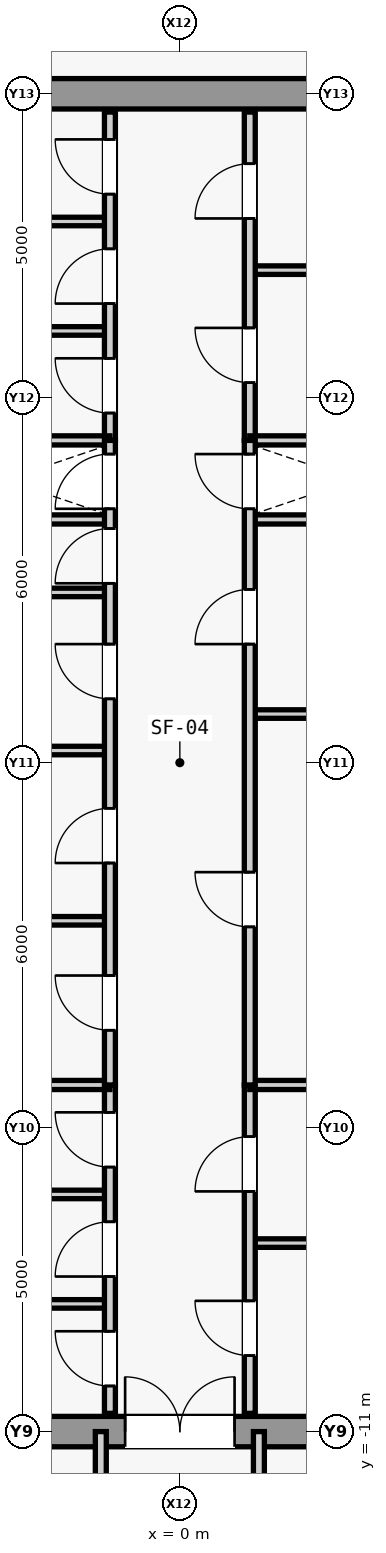
"""IFC4 building model, lengths in metres.
Left out: names, types, materials, properties, quantities, classifications, styles, units other than length and angle.
Written with IfcOpenShell. Run it as: python <this file> out.ifc"""

import sys

from ifc_helpers import new_model, si_unit, direction, frame, frame_2d, origin, place, context, subcontext, project, spatial, rectangle, extrude, source, transform, mapped, element, fill, save


model = new_model("IFC4")
c1 = context("Model", 3, precision=1e-05, world=origin(), true_north=direction((0.0, 1.0)))
c2 = subcontext(c1, "Body", "Model", "MODEL_VIEW")
j1 = project(units=[si_unit("LENGTHUNIT", "METRE"), si_unit("PLANEANGLEUNIT", "RADIAN")], contexts=[c1])
p1 = place(None, origin())
s1 = spatial("IfcSite", under=j1, at=p1, CompositionType="ELEMENT")
p2 = place(p1, origin())
s2 = spatial("IfcBuilding", under=s1, at=p2, CompositionType="ELEMENT")
p3 = place(p2, frame((0.0, 0.0, 277.5)))
s3 = spatial("IfcBuildingStorey", under=s2, at=p3, CompositionType="ELEMENT", Elevation=277.5)
m1 = source(origin(), c2, "Body", "SweptSolid", [
    extrude(rectangle(XDim=9.2, YDim=0.5, at=frame_2d((4.6, 0.0))), origin(), (0.0, 0.0, 1.0), 3.78),
])
p4 = place(p3, frame((-4.6, -11.0, 0.0), z_axis=(0.0, 0.0, 1.0), x_axis=(1.0, 0.0, 0.0)))
e1 = element("IfcWall", 1, at=p4, inside=s3, PredefinedType="SHEAR", context=c2, shape_type="MappedRepresentation", body=[
    mapped(m1, transform((0.0, 0.0, 0.0), scale=1.0)),
])
m2 = source(origin(), c2, "Body", "SweptSolid", [
    extrude(rectangle(XDim=1.8, YDim=2.25, at=frame_2d((0.9, 1.125))), frame((0.0, 0.26, 0.0), z_axis=(0.0, -1.0, 0.0), x_axis=(1.0, 0.0, 0.0)), (0.0, 0.0, 1.0), 0.52),
])
p5 = place(p4, frame((3.7, 0.0, 0.0)))
e2 = element("IfcOpeningElement", 2, at=p5, cuts=e1, PredefinedType="OPENING", context=c2, shape_type="MappedRepresentation", body=[
    mapped(m2, transform((0.0, 0.0, 0.0), scale=1.0)),
])
p6 = place(p3, frame((-4.6, 11.0, 0.0), z_axis=(0.0, 0.0, 1.0), x_axis=(1.0, 0.0, 0.0)))
e3 = element("IfcWall", 3, at=p6, inside=s3, PredefinedType="SHEAR", context=c2, shape_type="MappedRepresentation", body=[
    mapped(m1, transform((0.0, 0.0, 0.0), scale=1.0)),
])
m3 = source(origin(), c2, "Body", "SweptSolid", [
    extrude(rectangle(XDim=3.45, YDim=0.15, at=frame_2d((1.725, 0.0))), origin(), (0.0, 0.0, 1.0), 3.78),
])
for number, where, z_axis, x_axis in (
    (4, (-4.6, 4.0, 0.0), (0.0, 0.0, 1.0), (1.0, 0.0, 0.0)),
    (5, (1.15, 4.0, 0.0), (0.0, 0.0, 1.0), (1.0, 0.0, 0.0)),
):
    element("IfcWall", number, at=place(p3, frame(where, z_axis=z_axis, x_axis=x_axis)), inside=s3, PredefinedType="PARTITIONING", context=c2, shape_type="MappedRepresentation", body=[
        mapped(m3, transform((0.0, 0.0, 0.0), scale=1.0)),
    ])
m4 = source(origin(), c2, "Body", "SweptSolid", [
    extrude(rectangle(XDim=3.45, YDim=0.14, at=frame_2d((1.725, 0.0))), origin(), (0.0, 0.0, 1.0), 3.78),
])
for number, where, z_axis, x_axis in (
    (6, (-4.6, -8.9, 0.0), (0.0, 0.0, 1.0), (1.0, 0.0, 0.0)),
    (7, (-4.6, -7.1, 0.0), (0.0, 0.0, 1.0), (1.0, 0.0, 0.0)),
):
    element("IfcWall", number, at=place(p3, frame(where, z_axis=z_axis, x_axis=x_axis)), inside=s3, PredefinedType="PARTITIONING", context=c2, shape_type="MappedRepresentation", body=[
        mapped(m4, transform((0.0, 0.0, 0.0), scale=1.0)),
    ])
m5 = source(origin(), c2, "Body", "SweptSolid", [
    extrude(rectangle(XDim=5.4, YDim=0.18, at=frame_2d((2.7, 0.0))), origin(), (0.0, 0.0, 1.0), 3.78),
])
p7 = place(p3, frame((-1.15, -10.7, 0.0), z_axis=(0.0, 0.0, 1.0), x_axis=(0.0, 1.0, 0.0)))
e8 = element("IfcWall", 8, at=p7, inside=s3, PredefinedType="PARTITIONING", context=c2, shape_type="MappedRepresentation", body=[
    mapped(m5, transform((0.0, 0.0, 0.0), scale=1.0)),
])
m6 = source(origin(), c2, "Body", "SweptSolid", [
    extrude(rectangle(XDim=0.9, YDim=2.15, at=frame_2d((0.45, 1.075))), frame((0.0, 0.1, 0.0), z_axis=(0.0, -1.0, 0.0), x_axis=(1.0, 0.0, 0.0)), (0.0, 0.0, 1.0), 0.2),
])
p8 = place(p7, frame((0.45, 0.0, 0.0)))
e9 = element("IfcOpeningElement", 9, at=p8, cuts=e8, PredefinedType="OPENING", context=c2, shape_type="MappedRepresentation", body=[
    mapped(m6, transform((0.0, 0.0, 0.0), scale=1.0)),
])
p9 = place(p7, frame((2.25, 0.0, 0.0)))
e10 = element("IfcOpeningElement", 10, at=p9, cuts=e8, PredefinedType="OPENING", context=c2, shape_type="MappedRepresentation", body=[
    mapped(m6, transform((0.0, 0.0, 0.0), scale=1.0)),
])
p10 = place(p7, frame((4.05, 0.0, 0.0)))
e11 = element("IfcOpeningElement", 11, at=p10, cuts=e8, PredefinedType="OPENING", context=c2, shape_type="MappedRepresentation", body=[
    mapped(m6, transform((0.0, 0.0, 0.0), scale=1.0)),
])
p11 = place(p3, frame((1.15, -7.9, 0.0), z_axis=(0.0, 0.0, 1.0), x_axis=(1.0, 0.0, 0.0)))
e12 = element("IfcWall", 12, at=p11, inside=s3, PredefinedType="PARTITIONING", context=c2, shape_type="MappedRepresentation", body=[
    mapped(m4, transform((0.0, 0.0, 0.0), scale=1.0)),
])
p12 = place(p3, frame((1.15, -10.7, 0.0), z_axis=(0.0, 0.0, 1.0), x_axis=(0.0, 1.0, 0.0)))
e13 = element("IfcWall", 13, at=p12, inside=s3, PredefinedType="PARTITIONING", context=c2, shape_type="MappedRepresentation", body=[
    mapped(m5, transform((0.0, 0.0, 0.0), scale=1.0)),
])
p13 = place(p12, frame((0.95, 0.0, 0.0)))
e14 = element("IfcOpeningElement", 14, at=p13, cuts=e13, PredefinedType="OPENING", context=c2, shape_type="MappedRepresentation", body=[
    mapped(m6, transform((0.0, 0.0, 0.0), scale=1.0)),
])
p14 = place(p12, frame((3.65, 0.0, 0.0)))
e15 = element("IfcOpeningElement", 15, at=p14, cuts=e13, PredefinedType="OPENING", context=c2, shape_type="MappedRepresentation", body=[
    mapped(m6, transform((0.0, 0.0, 0.0), scale=1.0)),
])
for number, where, z_axis, x_axis in (
    (16, (-4.6, -5.3, 0.0), (0.0, 0.0, 1.0), (1.0, 0.0, 0.0)),
    (17, (1.15, -5.3, 0.0), (0.0, 0.0, 1.0), (1.0, 0.0, 0.0)),
):
    element("IfcWall", number, at=place(p3, frame(where, z_axis=z_axis, x_axis=x_axis)), inside=s3, PredefinedType="PARTITIONING", context=c2, shape_type="MappedRepresentation", body=[
        mapped(m3, transform((0.0, 0.0, 0.0), scale=1.0)),
    ])
for number, where, z_axis, x_axis in (
    (18, (-4.6, 7.1, 0.0), (0.0, 0.0, 1.0), (1.0, 0.0, 0.0)),
    (19, (-4.6, 8.9, 0.0), (0.0, 0.0, 1.0), (1.0, 0.0, 0.0)),
):
    element("IfcWall", number, at=place(p3, frame(where, z_axis=z_axis, x_axis=x_axis)), inside=s3, PredefinedType="PARTITIONING", context=c2, shape_type="MappedRepresentation", body=[
        mapped(m4, transform((0.0, 0.0, 0.0), scale=1.0)),
    ])
p15 = place(p3, frame((-1.15, 5.3, 0.0), z_axis=(0.0, 0.0, 1.0), x_axis=(0.0, 1.0, 0.0)))
e20 = element("IfcWall", 20, at=p15, inside=s3, PredefinedType="PARTITIONING", context=c2, shape_type="MappedRepresentation", body=[
    mapped(m5, transform((0.0, 0.0, 0.0), scale=1.0)),
])
p16 = place(p15, frame((0.45, 0.0, 0.0)))
e21 = element("IfcOpeningElement", 21, at=p16, cuts=e20, PredefinedType="OPENING", context=c2, shape_type="MappedRepresentation", body=[
    mapped(m6, transform((0.0, 0.0, 0.0), scale=1.0)),
])
p17 = place(p15, frame((2.25, 0.0, 0.0)))
e22 = element("IfcOpeningElement", 22, at=p17, cuts=e20, PredefinedType="OPENING", context=c2, shape_type="MappedRepresentation", body=[
    mapped(m6, transform((0.0, 0.0, 0.0), scale=1.0)),
])
p18 = place(p15, frame((4.05, 0.0, 0.0)))
e23 = element("IfcOpeningElement", 23, at=p18, cuts=e20, PredefinedType="OPENING", context=c2, shape_type="MappedRepresentation", body=[
    mapped(m6, transform((0.0, 0.0, 0.0), scale=1.0)),
])
p19 = place(p3, frame((1.15, 8.1, 0.0), z_axis=(0.0, 0.0, 1.0), x_axis=(1.0, 0.0, 0.0)))
e24 = element("IfcWall", 24, at=p19, inside=s3, PredefinedType="PARTITIONING", context=c2, shape_type="MappedRepresentation", body=[
    mapped(m4, transform((0.0, 0.0, 0.0), scale=1.0)),
])
p20 = place(p3, frame((1.15, 5.3, 0.0), z_axis=(0.0, 0.0, 1.0), x_axis=(0.0, 1.0, 0.0)))
e25 = element("IfcWall", 25, at=p20, inside=s3, PredefinedType="PARTITIONING", context=c2, shape_type="MappedRepresentation", body=[
    mapped(m5, transform((0.0, 0.0, 0.0), scale=1.0)),
])
p21 = place(p20, frame((0.95, 0.0, 0.0)))
e26 = element("IfcOpeningElement", 26, at=p21, cuts=e25, PredefinedType="OPENING", context=c2, shape_type="MappedRepresentation", body=[
    mapped(m6, transform((0.0, 0.0, 0.0), scale=1.0)),
])
p22 = place(p20, frame((3.65, 0.0, 0.0)))
e27 = element("IfcOpeningElement", 27, at=p22, cuts=e25, PredefinedType="OPENING", context=c2, shape_type="MappedRepresentation", body=[
    mapped(m6, transform((0.0, 0.0, 0.0), scale=1.0)),
])
for number, where, z_axis, x_axis in (
    (28, (-4.6, 5.3, 0.0), (0.0, 0.0, 1.0), (1.0, 0.0, 0.0)),
    (29, (1.15, 5.3, 0.0), (0.0, 0.0, 1.0), (1.0, 0.0, 0.0)),
):
    element("IfcWall", number, at=place(p3, frame(where, z_axis=z_axis, x_axis=x_axis)), inside=s3, PredefinedType="PARTITIONING", context=c2, shape_type="MappedRepresentation", body=[
        mapped(m3, transform((0.0, 0.0, 0.0), scale=1.0)),
    ])
p23 = place(p3, frame((-4.6, -2.6, 0.0), z_axis=(0.0, 0.0, 1.0), x_axis=(1.0, 0.0, 0.0)))
e30 = element("IfcWall", 30, at=p23, inside=s3, PredefinedType="PARTITIONING", context=c2, shape_type="MappedRepresentation", body=[
    mapped(m4, transform((0.0, 0.0, 0.0), scale=1.0)),
])
m7 = source(origin(), c2, "Body", "SweptSolid", [
    extrude(rectangle(XDim=3.45, YDim=0.14, at=frame_2d((1.725, 0.0))), origin(), (0.0, 0.0, 1.0), 3.085),
])
p24 = place(p3, frame((-4.6, 0.2, 0.0), z_axis=(0.0, 0.0, 1.0), x_axis=(1.0, 0.0, 0.0)))
e31 = element("IfcWall", 31, at=p24, inside=s3, PredefinedType="PARTITIONING", context=c2, shape_type="MappedRepresentation", body=[
    mapped(m7, transform((0.0, 0.0, 0.0), scale=1.0)),
])
p25 = place(p3, frame((-4.6, 2.8, 0.0), z_axis=(0.0, 0.0, 1.0), x_axis=(1.0, 0.0, 0.0)))
e32 = element("IfcWall", 32, at=p25, inside=s3, PredefinedType="PARTITIONING", context=c2, shape_type="MappedRepresentation", body=[
    mapped(m4, transform((0.0, 0.0, 0.0), scale=1.0)),
])
m8 = source(origin(), c2, "Body", "SweptSolid", [
    extrude(rectangle(XDim=10.6, YDim=0.18, at=frame_2d((5.3, 0.0))), origin(), (0.0, 0.0, 1.0), 3.78),
])
p26 = place(p3, frame((-1.15, -5.3, 0.0), z_axis=(0.0, 0.0, 1.0), x_axis=(0.0, 1.0, 0.0)))
e33 = element("IfcWall", 33, at=p26, inside=s3, PredefinedType="PARTITIONING", context=c2, shape_type="MappedRepresentation", body=[
    mapped(m8, transform((0.0, 0.0, 0.0), scale=1.0)),
])
p27 = place(p26, frame((0.9, 0.0, 0.0)))
e34 = element("IfcOpeningElement", 34, at=p27, cuts=e33, PredefinedType="OPENING", context=c2, shape_type="MappedRepresentation", body=[
    mapped(m6, transform((0.0, 0.0, 0.0), scale=1.0)),
])
p28 = place(p26, frame((3.65, 0.0, 0.0)))
e35 = element("IfcOpeningElement", 35, at=p28, cuts=e33, PredefinedType="OPENING", context=c2, shape_type="MappedRepresentation", body=[
    mapped(m6, transform((0.0, 0.0, 0.0), scale=1.0)),
])
p29 = place(p26, frame((6.35, 0.0, 0.0)))
e36 = element("IfcOpeningElement", 36, at=p29, cuts=e33, PredefinedType="OPENING", context=c2, shape_type="MappedRepresentation", body=[
    mapped(m6, transform((0.0, 0.0, 0.0), scale=1.0)),
])
p30 = place(p26, frame((8.25, 0.0, 0.0)))
e37 = element("IfcOpeningElement", 37, at=p30, cuts=e33, PredefinedType="OPENING", context=c2, shape_type="MappedRepresentation", body=[
    mapped(m6, transform((0.0, 0.0, 0.0), scale=1.0)),
])
p31 = place(p26, frame((9.475, 0.0, 0.0)))
e38 = element("IfcOpeningElement", 38, at=p31, cuts=e33, PredefinedType="OPENING", context=c2, shape_type="MappedRepresentation", body=[
    mapped(m6, transform((0.0, 0.0, 0.0), scale=1.0)),
])
p32 = place(p3, frame((1.15, 0.8, 0.0), z_axis=(0.0, 0.0, 1.0), x_axis=(1.0, 0.0, 0.0)))
e39 = element("IfcWall", 39, at=p32, inside=s3, PredefinedType="PARTITIONING", context=c2, shape_type="MappedRepresentation", body=[
    mapped(m4, transform((0.0, 0.0, 0.0), scale=1.0)),
])
p33 = place(p3, frame((1.15, -5.3, 0.0), z_axis=(0.0, 0.0, 1.0), x_axis=(0.0, 1.0, 0.0)))
e40 = element("IfcWall", 40, at=p33, inside=s3, PredefinedType="PARTITIONING", context=c2, shape_type="MappedRepresentation", body=[
    mapped(m8, transform((0.0, 0.0, 0.0), scale=1.0)),
])
p34 = place(p33, frame((2.6, 0.0, 0.0)))
e41 = element("IfcOpeningElement", 41, at=p34, cuts=e40, PredefinedType="OPENING", context=c2, shape_type="MappedRepresentation", body=[
    mapped(m6, transform((0.0, 0.0, 0.0), scale=1.0)),
])
p35 = place(p33, frame((7.25, 0.0, 0.0)))
e42 = element("IfcOpeningElement", 42, at=p35, cuts=e40, PredefinedType="OPENING", context=c2, shape_type="MappedRepresentation", body=[
    mapped(m6, transform((0.0, 0.0, 0.0), scale=1.0)),
])
p36 = place(p33, frame((9.475, 0.0, 0.0)))
e43 = element("IfcOpeningElement", 43, at=p36, cuts=e40, PredefinedType="OPENING", context=c2, shape_type="MappedRepresentation", body=[
    mapped(m6, transform((0.0, 0.0, 0.0), scale=1.0)),
])
m9 = source(origin(), c2, "Body", "SweptSolid", [
    extrude(rectangle(XDim=6.0, YDim=0.18, at=frame_2d((3.0, 0.0))), origin(), (0.0, 0.0, 1.0), 3.78),
])
for number, where, z_axis, x_axis in (
    (44, (-1.3, -17.0, 0.0), (0.0, 0.0, 1.0), (0.0, 1.0, 0.0)),
    (45, (1.3, -17.0, 0.0), (0.0, 0.0, 1.0), (0.0, 1.0, 0.0)),
):
    element("IfcWall", number, at=place(p3, frame(where, z_axis=z_axis, x_axis=x_axis)), inside=s3, PredefinedType="PARTITIONING", context=c2, shape_type="MappedRepresentation", body=[
        mapped(m9, transform((0.0, 0.0, 0.0), scale=1.0)),
    ])
m10 = source(origin(), c2, "Body", "SweptSolid", [
    extrude(rectangle(XDim=0.9, YDim=2.15, at=frame_2d((0.45, 1.075))), frame((0.0, 0.025, 0.0), z_axis=(0.0, -1.0, 0.0), x_axis=(1.0, 0.0, 0.0)), (0.0, 0.0, 1.0), 0.05),
])
p37 = place(p8, origin())
e46 = element("IfcDoor", 46, at=p37, inside=s3, OperationType="SINGLE_SWING_RIGHT", PredefinedType="DOOR", context=c2, shape_type="MappedRepresentation", body=[
    mapped(m10, transform((0.0, 0.0, 0.0), scale=1.0)),
])
fill(e9, e46)
p38 = place(p9, origin())
e47 = element("IfcDoor", 47, at=p38, inside=s3, OperationType="SINGLE_SWING_LEFT", PredefinedType="DOOR", context=c2, shape_type="MappedRepresentation", body=[
    mapped(m10, transform((0.0, 0.0, 0.0), scale=1.0)),
])
fill(e10, e47)
p39 = place(p10, origin())
e48 = element("IfcDoor", 48, at=p39, inside=s3, OperationType="SINGLE_SWING_RIGHT", PredefinedType="DOOR", context=c2, shape_type="MappedRepresentation", body=[
    mapped(m10, transform((0.0, 0.0, 0.0), scale=1.0)),
])
fill(e11, e48)
p40 = place(p13, origin())
e49 = element("IfcDoor", 49, at=p40, inside=s3, OperationType="SINGLE_SWING_RIGHT", PredefinedType="DOOR", context=c2, shape_type="MappedRepresentation", body=[
    mapped(m10, transform((0.0, 0.0, 0.0), scale=1.0)),
])
fill(e14, e49)
p41 = place(p14, origin())
e50 = element("IfcDoor", 50, at=p41, inside=s3, OperationType="SINGLE_SWING_LEFT", PredefinedType="DOOR", context=c2, shape_type="MappedRepresentation", body=[
    mapped(m10, transform((0.0, 0.0, 0.0), scale=1.0)),
])
fill(e15, e50)
m11 = source(origin(), c2, "Body", "SweptSolid", [
    extrude(rectangle(XDim=1.8, YDim=2.25, at=frame_2d((0.9, 1.125))), frame((0.0, 0.025, 0.0), z_axis=(0.0, -1.0, 0.0), x_axis=(1.0, 0.0, 0.0)), (0.0, 0.0, 1.0), 0.05),
])
p42 = place(p5, origin())
e51 = element("IfcDoor", 51, at=p42, inside=s3, OperationType="SINGLE_SWING_LEFT", PredefinedType="DOOR", context=c2, shape_type="MappedRepresentation", body=[
    mapped(m11, transform((0.0, 0.0, 0.0), scale=1.0)),
])
fill(e2, e51)
p43 = place(p16, origin())
e52 = element("IfcDoor", 52, at=p43, inside=s3, OperationType="SINGLE_SWING_RIGHT", PredefinedType="DOOR", context=c2, shape_type="MappedRepresentation", body=[
    mapped(m10, transform((0.0, 0.0, 0.0), scale=1.0)),
])
fill(e21, e52)
p44 = place(p17, origin())
e53 = element("IfcDoor", 53, at=p44, inside=s3, OperationType="SINGLE_SWING_LEFT", PredefinedType="DOOR", context=c2, shape_type="MappedRepresentation", body=[
    mapped(m10, transform((0.0, 0.0, 0.0), scale=1.0)),
])
fill(e22, e53)
p45 = place(p18, origin())
e54 = element("IfcDoor", 54, at=p45, inside=s3, OperationType="SINGLE_SWING_RIGHT", PredefinedType="DOOR", context=c2, shape_type="MappedRepresentation", body=[
    mapped(m10, transform((0.0, 0.0, 0.0), scale=1.0)),
])
fill(e23, e54)
p46 = place(p21, origin())
e55 = element("IfcDoor", 55, at=p46, inside=s3, OperationType="SINGLE_SWING_RIGHT", PredefinedType="DOOR", context=c2, shape_type="MappedRepresentation", body=[
    mapped(m10, transform((0.0, 0.0, 0.0), scale=1.0)),
])
fill(e26, e55)
p47 = place(p22, origin())
e56 = element("IfcDoor", 56, at=p47, inside=s3, OperationType="SINGLE_SWING_LEFT", PredefinedType="DOOR", context=c2, shape_type="MappedRepresentation", body=[
    mapped(m10, transform((0.0, 0.0, 0.0), scale=1.0)),
])
fill(e27, e56)
p48 = place(p27, origin())
e57 = element("IfcDoor", 57, at=p48, inside=s3, OperationType="SINGLE_SWING_RIGHT", PredefinedType="DOOR", context=c2, shape_type="MappedRepresentation", body=[
    mapped(m10, transform((0.0, 0.0, 0.0), scale=1.0)),
])
fill(e34, e57)
p49 = place(p28, origin())
e58 = element("IfcDoor", 58, at=p49, inside=s3, OperationType="SINGLE_SWING_LEFT", PredefinedType="DOOR", context=c2, shape_type="MappedRepresentation", body=[
    mapped(m10, transform((0.0, 0.0, 0.0), scale=1.0)),
])
fill(e35, e58)
p50 = place(p29, origin())
e59 = element("IfcDoor", 59, at=p50, inside=s3, OperationType="SINGLE_SWING_RIGHT", PredefinedType="DOOR", context=c2, shape_type="MappedRepresentation", body=[
    mapped(m10, transform((0.0, 0.0, 0.0), scale=1.0)),
])
fill(e36, e59)
p51 = place(p30, origin())
e60 = element("IfcDoor", 60, at=p51, inside=s3, OperationType="SINGLE_SWING_LEFT", PredefinedType="DOOR", context=c2, shape_type="MappedRepresentation", body=[
    mapped(m10, transform((0.0, 0.0, 0.0), scale=1.0)),
])
fill(e37, e60)
p52 = place(p34, origin())
e61 = element("IfcDoor", 61, at=p52, inside=s3, OperationType="SINGLE_SWING_RIGHT", PredefinedType="DOOR", context=c2, shape_type="MappedRepresentation", body=[
    mapped(m10, transform((0.0, 0.0, 0.0), scale=1.0)),
])
fill(e41, e61)
p53 = place(p35, origin())
e62 = element("IfcDoor", 62, at=p53, inside=s3, OperationType="SINGLE_SWING_LEFT", PredefinedType="DOOR", context=c2, shape_type="MappedRepresentation", body=[
    mapped(m10, transform((0.0, 0.0, 0.0), scale=1.0)),
])
fill(e42, e62)
p54 = place(p31, origin())
e63 = element("IfcDoor", 63, at=p54, inside=s3, OperationType="SINGLE_SWING_LEFT", PredefinedType="DOOR", context=c2, shape_type="MappedRepresentation", body=[
    mapped(m10, transform((0.0, 0.0, 0.0), scale=1.0)),
])
fill(e38, e63)
p55 = place(p36, origin())
e64 = element("IfcDoor", 64, at=p55, inside=s3, OperationType="SINGLE_SWING_RIGHT", PredefinedType="DOOR", context=c2, shape_type="MappedRepresentation", body=[
    mapped(m10, transform((0.0, 0.0, 0.0), scale=1.0)),
])
fill(e43, e64)
save(model, sys.argv[1])
